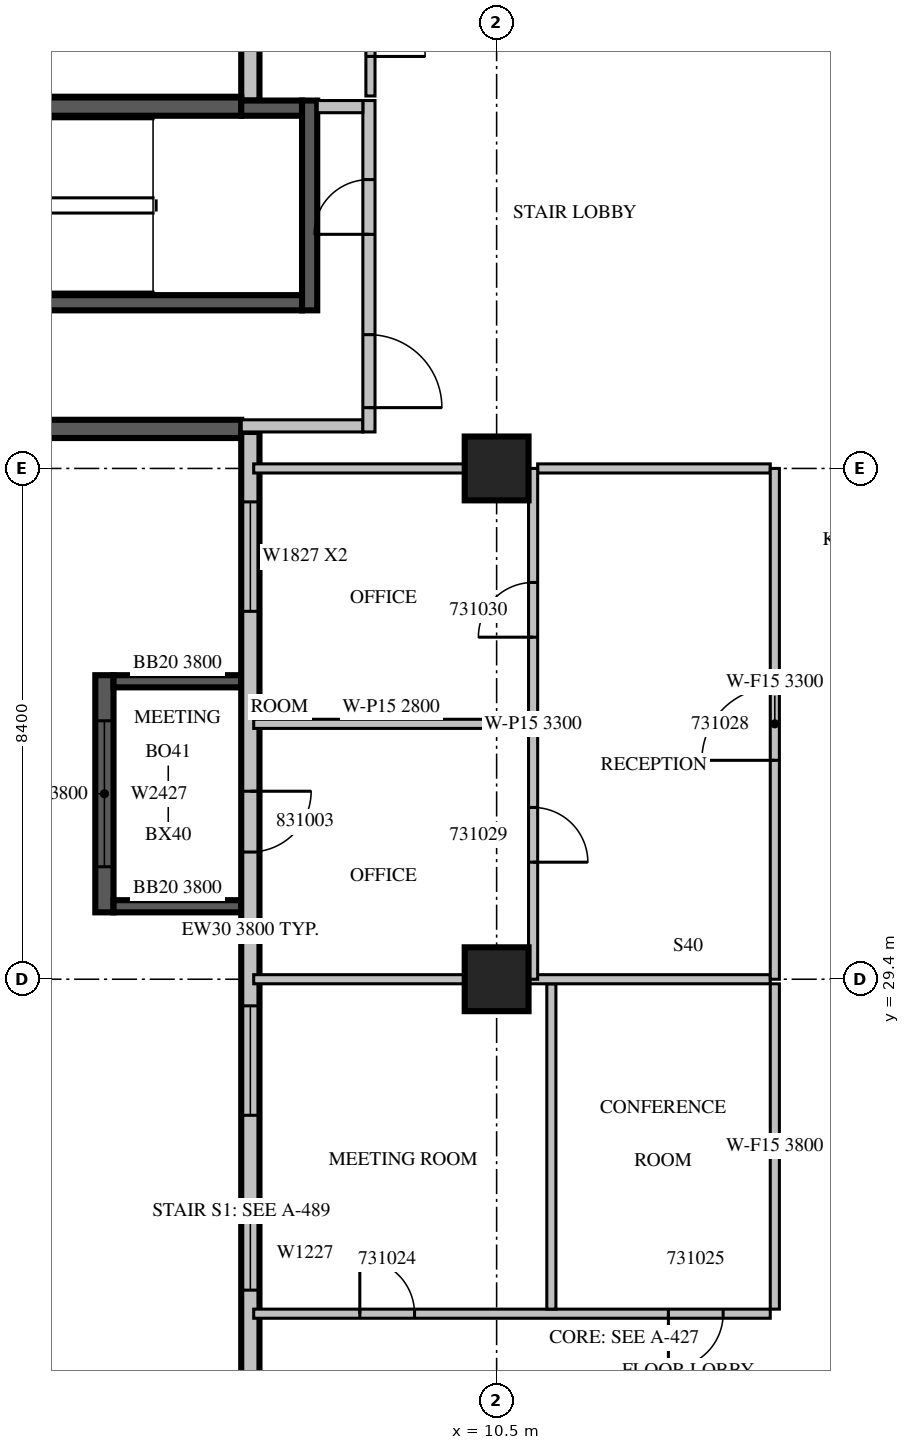
"""IFC4 building model, lengths in metres.
Left out: names, types, materials, properties, quantities, classifications, styles, units other than length and angle.
Written with IfcOpenShell. Run it as: python <this file> out.ifc"""

import sys

from ifc_helpers import new_model, si_unit, direction, frame, frame_2d, origin, origin_2d, place, context, subcontext, project, spatial, rectangle, extrude, source, transform, mapped, element, fill, save


model = new_model("IFC4")
c1 = context("Model", 3, precision=1e-05, world=origin(), true_north=direction((0.0, 1.0)))
c2 = subcontext(c1, "Body", "Model", "MODEL_VIEW")
j1 = project(units=[si_unit("LENGTHUNIT", "METRE"), si_unit("PLANEANGLEUNIT", "RADIAN")], contexts=[c1])
p1 = place(None, origin())
s1 = spatial("IfcSite", under=j1, at=p1, CompositionType="ELEMENT")
p2 = place(p1, origin())
s2 = spatial("IfcBuilding", under=s1, at=p2, CompositionType="ELEMENT")
p3 = place(p2, frame((0.0, 0.0, 141.3)))
s3 = spatial("IfcBuildingStorey", under=s2, at=p3, CompositionType="ELEMENT", Elevation=141.3)
m1 = source(origin(), c2, "Body", "SweptSolid", [
    extrude(rectangle(XDim=1.05, YDim=1.05, at=origin_2d()), origin(), (0.0, 0.0, 1.0), 4.2),
])
for number, where, z_axis, x_axis in (
    (1, (10.5, 29.4, 0.0), (0.0, 0.0, 1.0), (1.0, 0.0, 0.0)),
    (2, (10.5, 37.8, 0.0), (0.0, 0.0, 1.0), (1.0, 0.0, 0.0)),
):
    element("IfcColumn", number, at=place(p3, frame(where, z_axis=z_axis, x_axis=x_axis)), inside=s3, PredefinedType="COLUMN", context=c2, shape_type="MappedRepresentation", body=[
        mapped(m1, transform((0.0, 0.0, 0.0), scale=1.0)),
    ])
m2 = source(origin(), c2, "Body", "SweptSolid", [
    extrude(rectangle(XDim=3.9, YDim=0.3, at=frame_2d((1.95, 0.0))), origin(), (0.0, 0.0, 1.0), 3.8),
])
p4 = place(p3, frame((4.05, 34.4, 0.0), z_axis=(0.0, 0.0, 1.0), x_axis=(0.0, -1.0, 0.0)))
e3 = element("IfcWall", 3, at=p4, inside=s3, PredefinedType="SOLIDWALL", context=c2, shape_type="MappedRepresentation", body=[
    mapped(m2, transform((0.0, 0.0, 0.0), scale=1.0)),
])
m3 = source(origin(), c2, "Body", "SweptSolid", [
    extrude(rectangle(XDim=2.4, YDim=2.7, at=frame_2d((1.2, 1.35))), frame((0.0, 0.16, 0.0), z_axis=(0.0, -1.0, 0.0), x_axis=(1.0, 0.0, 0.0)), (0.0, 0.0, 1.0), 0.32),
])
p5 = place(p4, frame((0.75, 0.0, 0.6)))
e4 = element("IfcOpeningElement", 4, at=p5, cuts=e3, PredefinedType="OPENING", context=c2, shape_type="MappedRepresentation", body=[
    mapped(m3, transform((0.0, 0.0, 0.0), scale=1.0)),
])
m4 = source(origin(), c2, "Body", "SweptSolid", [
    extrude(rectangle(XDim=2.1, YDim=0.2, at=frame_2d((1.05, 0.0))), origin(), (0.0, 0.0, 1.0), 3.8),
])
for number, where, z_axis, x_axis in (
    (5, (6.3, 34.3, 0.0), (0.0, 0.0, 1.0), (-1.0, 0.0, 0.0)),
    (6, (6.3, 30.6, 0.0), (0.0, 0.0, 1.0), (-1.0, 0.0, 0.0)),
):
    element("IfcWall", number, at=place(p3, frame(where, z_axis=z_axis, x_axis=x_axis)), inside=s3, PredefinedType="SOLIDWALL", context=c2, shape_type="MappedRepresentation", body=[
        mapped(m4, transform((0.0, 0.0, 0.0), scale=1.0)),
    ])
m5 = source(origin(), c2, "Body", "SweptSolid", [
    extrude(rectangle(XDim=9.91, YDim=0.3, at=frame_2d((4.955, 0.0))), origin(), (0.0, 0.0, 1.0), 3.8),
])
p6 = place(p3, frame((6.45, 53.76, 0.0), z_axis=(0.0, 0.0, 1.0), x_axis=(0.0, -1.0, 0.0)))
e7 = element("IfcWall", 7, at=p6, inside=s3, PredefinedType="STANDARD", context=c2, shape_type="MappedRepresentation", body=[
    mapped(m5, transform((0.0, 0.0, 0.0), scale=1.0)),
])
p7 = place(p6, frame((4.272, 0.0, 0.6)))
e8 = element("IfcOpeningElement", 8, at=p7, cuts=e7, PredefinedType="OPENING", context=c2, shape_type="MappedRepresentation", body=[
    mapped(m3, transform((0.0, 0.0, 0.0), scale=1.0)),
])
p8 = place(p6, frame((0.936, 0.0, 0.6)))
e9 = element("IfcOpeningElement", 9, at=p8, cuts=e7, PredefinedType="OPENING", context=c2, shape_type="MappedRepresentation", body=[
    mapped(m3, transform((0.0, 0.0, 0.0), scale=1.0)),
])
m6 = source(origin(), c2, "Body", "SweptSolid", [
    extrude(rectangle(XDim=6.1, YDim=0.3, at=frame_2d((3.05, 0.0))), origin(), (0.0, 0.0, 1.0), 3.8),
])
for number, where, z_axis, x_axis in (
    (10, (6.3, 43.75, 0.0), (0.0, 0.0, 1.0), (-1.0, 0.0, 0.0)),
    (11, (0.2, 38.45, 0.0), (0.0, 0.0, 1.0), (1.0, 0.0, 0.0)),
):
    element("IfcWall", number, at=place(p3, frame(where, z_axis=z_axis, x_axis=x_axis)), inside=s3, PredefinedType="SOLIDWALL", context=c2, shape_type="MappedRepresentation", body=[
        mapped(m6, transform((0.0, 0.0, 0.0), scale=1.0)),
    ])
m7 = source(origin(), c2, "Body", "SweptSolid", [
    extrude(rectangle(XDim=16.4, YDim=0.3, at=frame_2d((8.2, 0.0))), origin(), (0.0, 0.0, 1.0), 3.8),
])
p9 = place(p3, frame((6.45, 38.4, 0.0), z_axis=(0.0, 0.0, 1.0), x_axis=(0.0, -1.0, 0.0)))
e12 = element("IfcWall", 12, at=p9, inside=s3, PredefinedType="STANDARD", context=c2, shape_type="MappedRepresentation", body=[
    mapped(m7, transform((0.0, 0.0, 0.0), scale=1.0)),
])
m8 = source(origin(), c2, "Body", "SweptSolid", [
    extrude(rectangle(XDim=1.8, YDim=2.7, at=frame_2d((0.9, 1.35))), frame((0.0, 0.16, 0.0), z_axis=(0.0, -1.0, 0.0), x_axis=(1.0, 0.0, 0.0)), (0.0, 0.0, 1.0), 0.32),
])
p10 = place(p9, frame((1.15, 0.0, 0.6)))
e13 = element("IfcOpeningElement", 13, at=p10, cuts=e12, PredefinedType="OPENING", context=c2, shape_type="MappedRepresentation", body=[
    mapped(m8, transform((0.0, 0.0, 0.0), scale=1.0)),
])
p11 = place(p9, frame((9.438, 0.0, 0.6)))
e14 = element("IfcOpeningElement", 14, at=p11, cuts=e12, PredefinedType="OPENING", context=c2, shape_type="MappedRepresentation", body=[
    mapped(m8, transform((0.0, 0.0, 0.0), scale=1.0)),
])
m9 = source(origin(), c2, "Body", "SweptSolid", [
    extrude(rectangle(XDim=1.2, YDim=2.7, at=frame_2d((0.6, 1.35))), frame((0.0, 0.16, 0.0), z_axis=(0.0, -1.0, 0.0), x_axis=(1.0, 0.0, 0.0)), (0.0, 0.0, 1.0), 0.32),
])
p12 = place(p9, frame((12.912, 0.0, 0.6)))
e15 = element("IfcOpeningElement", 15, at=p12, cuts=e12, PredefinedType="OPENING", context=c2, shape_type="MappedRepresentation", body=[
    mapped(m9, transform((0.0, 0.0, 0.0), scale=1.0)),
])
m10 = source(origin(), c2, "Body", "SweptSolid", [
    extrude(rectangle(XDim=1.0, YDim=2.1, at=frame_2d((0.5, 1.05))), frame((0.0, 0.16, 0.0), z_axis=(0.0, -1.0, 0.0), x_axis=(1.0, 0.0, 0.0)), (0.0, 0.0, 1.0), 0.32),
])
p13 = place(p9, frame((5.908, 0.0, 0.0)))
e16 = element("IfcOpeningElement", 16, at=p13, cuts=e12, PredefinedType="OPENING", context=c2, shape_type="MappedRepresentation", body=[
    mapped(m10, transform((0.0, 0.0, 0.0), scale=1.0)),
])
m11 = source(origin(), c2, "Body", "SweptSolid", [
    extrude(rectangle(XDim=7.0, YDim=0.25, at=frame_2d((3.5, 0.0))), origin(), (0.0, 0.0, 1.0), 3.8),
])
p14 = place(p3, frame((0.3, 40.525, 0.0), z_axis=(0.0, 0.0, 1.0), x_axis=(1.0, 0.0, 0.0)))
e17 = element("IfcWall", 17, at=p14, inside=s3, PredefinedType="SOLIDWALL", context=c2, shape_type="MappedRepresentation", body=[
    mapped(m11, transform((0.0, 0.0, 0.0), scale=1.0)),
])
m12 = source(origin(), c2, "Body", "SweptSolid", [
    extrude(rectangle(XDim=1.1, YDim=2.1, at=frame_2d((0.55, 1.05))), frame((0.0, 0.135, 0.0), z_axis=(0.0, -1.0, 0.0), x_axis=(1.0, 0.0, 0.0)), (0.0, 0.0, 1.0), 0.27),
])
p15 = place(p14, frame((0.55, 0.0, 0.0)))
e18 = element("IfcOpeningElement", 18, at=p15, cuts=e17, PredefinedType="OPENING", context=c2, shape_type="MappedRepresentation", body=[
    mapped(m12, transform((0.0, 0.0, 0.0), scale=1.0)),
])
m13 = source(origin(), c2, "Body", "SweptSolid", [
    extrude(rectangle(XDim=1.0, YDim=0.25, at=frame_2d((0.5, 0.0))), origin(), (0.0, 0.0, 1.0), 3.8),
])
p16 = place(p3, frame((6.3, 43.725, 0.0), z_axis=(0.0, 0.0, 1.0), x_axis=(1.0, 0.0, 0.0)))
e19 = element("IfcWall", 19, at=p16, inside=s3, PredefinedType="SOLIDWALL", context=c2, shape_type="MappedRepresentation", body=[
    mapped(m13, transform((0.0, 0.0, 0.0), scale=1.0)),
])
m14 = source(origin(), c2, "Body", "SweptSolid", [
    extrude(rectangle(XDim=3.45, YDim=0.25, at=frame_2d((1.725, 0.0))), origin(), (0.0, 0.0, 1.0), 3.8),
])
p17 = place(p3, frame((7.425, 40.4, 0.0), z_axis=(0.0, 0.0, 1.0), x_axis=(0.0, 1.0, 0.0)))
e20 = element("IfcWall", 20, at=p17, inside=s3, PredefinedType="SOLIDWALL", context=c2, shape_type="MappedRepresentation", body=[
    mapped(m14, transform((0.0, 0.0, 0.0), scale=1.0)),
])
m15 = source(origin(), c2, "Body", "SweptSolid", [
    extrude(rectangle(XDim=2.0, YDim=0.2, at=frame_2d((1.0, 0.0))), origin(), (0.0, 0.0, 1.0), 3.8),
])
p18 = place(p3, frame((6.3, 38.5, 0.0), z_axis=(0.0, 0.0, 1.0), x_axis=(1.0, 0.0, 0.0)))
e21 = element("IfcWall", 21, at=p18, inside=s3, PredefinedType="PARTITIONING", context=c2, shape_type="MappedRepresentation", body=[
    mapped(m15, transform((0.0, 0.0, 0.0), scale=1.0)),
])
m16 = source(origin(), c2, "Body", "SweptSolid", [
    extrude(rectangle(XDim=5.45, YDim=0.2, at=frame_2d((2.725, 0.0))), origin(), (0.0, 0.0, 1.0), 3.8),
])
p19 = place(p3, frame((8.4, 38.4, 0.0), z_axis=(0.0, 0.0, 1.0), x_axis=(0.0, 1.0, 0.0)))
e22 = element("IfcWall", 22, at=p19, inside=s3, PredefinedType="PARTITIONING", context=c2, shape_type="MappedRepresentation", body=[
    mapped(m16, transform((0.0, 0.0, 0.0), scale=1.0)),
])
m17 = source(origin(), c2, "Body", "SweptSolid", [
    extrude(rectangle(XDim=1.2, YDim=2.1, at=frame_2d((0.6, 1.05))), frame((0.0, 0.11, 0.0), z_axis=(0.0, -1.0, 0.0), x_axis=(1.0, 0.0, 0.0)), (0.0, 0.0, 1.0), 0.22),
])
p20 = place(p19, frame((0.4, 0.0, 0.0)))
e23 = element("IfcOpeningElement", 23, at=p20, cuts=e22, PredefinedType="OPENING", context=c2, shape_type="MappedRepresentation", body=[
    mapped(m17, transform((0.0, 0.0, 0.0), scale=1.0)),
])
m18 = source(origin(), c2, "Body", "SweptSolid", [
    extrude(rectangle(XDim=0.9, YDim=2.1, at=frame_2d((0.45, 1.05))), frame((0.0, 0.11, 0.0), z_axis=(0.0, -1.0, 0.0), x_axis=(1.0, 0.0, 0.0)), (0.0, 0.0, 1.0), 0.22),
])
p21 = place(p19, frame((3.25, 0.0, 0.0)))
e24 = element("IfcOpeningElement", 24, at=p21, cuts=e22, PredefinedType="OPENING", context=c2, shape_type="MappedRepresentation", body=[
    mapped(m18, transform((0.0, 0.0, 0.0), scale=1.0)),
])
m19 = source(origin(), c2, "Body", "SweptSolid", [
    extrude(rectangle(XDim=0.75, YDim=0.2, at=frame_2d((0.375, 0.0))), origin(), (0.0, 0.0, 1.0), 3.8),
])
p22 = place(p3, frame((7.55, 43.75, 0.0), z_axis=(0.0, 0.0, 1.0), x_axis=(1.0, 0.0, 0.0)))
e25 = element("IfcWall", 25, at=p22, inside=s3, PredefinedType="PARTITIONING", context=c2, shape_type="MappedRepresentation", body=[
    mapped(m19, transform((0.0, 0.0, 0.0), scale=1.0)),
])
m20 = source(origin(), c2, "Body", "SweptSolid", [
    extrude(rectangle(XDim=8.495, YDim=0.15, at=frame_2d((4.247, 0.0))), origin(), (0.0, 0.0, 1.0), 3.8),
])
p23 = place(p3, frame((6.505, 23.9, 0.0), z_axis=(0.0, 0.0, 1.0), x_axis=(1.0, 0.0, 0.0)))
e26 = element("IfcWall", 26, at=p23, inside=s3, PredefinedType="PARTITIONING", context=c2, shape_type="MappedRepresentation", body=[
    mapped(m20, transform((0.0, 0.0, 0.0), scale=1.0)),
])
m21 = source(origin(), c2, "Body", "SweptSolid", [
    extrude(rectangle(XDim=0.9, YDim=2.1, at=frame_2d((0.45, 1.05))), frame((0.0, 0.085, 0.0), z_axis=(0.0, -1.0, 0.0), x_axis=(1.0, 0.0, 0.0)), (0.0, 0.0, 1.0), 0.17),
])
p24 = place(p23, frame((1.745, 0.0, 0.0)))
e27 = element("IfcOpeningElement", 27, at=p24, cuts=e26, PredefinedType="OPENING", context=c2, shape_type="MappedRepresentation", body=[
    mapped(m21, transform((0.0, 0.0, 0.0), scale=1.0)),
])
p25 = place(p23, frame((6.82, 0.0, 0.0)))
e28 = element("IfcOpeningElement", 28, at=p25, cuts=e26, PredefinedType="OPENING", context=c2, shape_type="MappedRepresentation", body=[
    mapped(m21, transform((0.0, 0.0, 0.0), scale=1.0)),
])
m22 = source(origin(), c2, "Body", "SweptSolid", [
    extrude(rectangle(XDim=5.35, YDim=0.15, at=frame_2d((2.675, 0.0))), origin(), (0.0, 0.0, 1.0), 3.8),
])
for number, where, z_axis, x_axis in (
    (29, (11.4, 23.975, 0.0), (0.0, 0.0, 1.0), (0.0, 1.0, 0.0)),
    (30, (15.075, 23.975, 0.0), (0.0, 0.0, 1.0), (0.0, 1.0, 0.0)),
):
    element("IfcWall", number, at=place(p3, frame(where, z_axis=z_axis, x_axis=x_axis)), inside=s3, PredefinedType="PARTITIONING", context=c2, shape_type="MappedRepresentation", body=[
        mapped(m22, transform((0.0, 0.0, 0.0), scale=1.0)),
    ])
m23 = source(origin(), c2, "Body", "SweptSolid", [
    extrude(rectangle(XDim=3.471, YDim=0.15, at=frame_2d((1.736, 0.0))), origin(), (0.0, 0.0, 1.0), 3.8),
])
p26 = place(p3, frame((9.976, 29.4, 0.0), z_axis=(0.0, 0.0, 1.0), x_axis=(-1.0, 0.0, 0.0)))
e31 = element("IfcWall", 31, at=p26, inside=s3, PredefinedType="PARTITIONING", context=c2, shape_type="MappedRepresentation", body=[
    mapped(m23, transform((0.0, 0.0, 0.0), scale=1.0)),
])
m24 = source(origin(), c2, "Body", "SweptSolid", [
    extrude(rectangle(XDim=3.976, YDim=0.15, at=frame_2d((1.988, 0.0))), origin(), (0.0, 0.0, 1.0), 3.8),
])
p27 = place(p3, frame((15.0, 29.4, 0.0), z_axis=(0.0, 0.0, 1.0), x_axis=(-1.0, 0.0, 0.0)))
e32 = element("IfcWall", 32, at=p27, inside=s3, PredefinedType="PARTITIONING", context=c2, shape_type="MappedRepresentation", body=[
    mapped(m24, transform((0.0, 0.0, 0.0), scale=1.0)),
])
m25 = source(origin(), c2, "Body", "SweptSolid", [
    extrude(rectangle(XDim=2.2, YDim=0.15, at=frame_2d((1.1, 0.0))), origin(), (0.0, 0.0, 1.0), 3.8),
])
p28 = place(p3, frame((8.425, 43.925, 0.0), z_axis=(0.0, 0.0, 1.0), x_axis=(0.0, 1.0, 0.0)))
e33 = element("IfcWall", 33, at=p28, inside=s3, PredefinedType="PARTITIONING", context=c2, shape_type="MappedRepresentation", body=[
    mapped(m25, transform((0.0, 0.0, 0.0), scale=1.0)),
])
p29 = place(p28, frame((0.65, 0.0, 0.0)))
e34 = element("IfcOpeningElement", 34, at=p29, cuts=e33, PredefinedType="OPENING", context=c2, shape_type="MappedRepresentation", body=[
    mapped(m21, transform((0.0, 0.0, 0.0), scale=1.0)),
])
m26 = source(origin(), c2, "Body", "SweptSolid", [
    extrude(rectangle(XDim=4.52, YDim=0.15, at=frame_2d((2.26, 0.0))), origin(), (0.0, 0.0, 1.0), 2.8),
])
p30 = place(p3, frame((11.025, 33.6, 0.0), z_axis=(0.0, 0.0, 1.0), x_axis=(-1.0, 0.0, 0.0)))
e35 = element("IfcWall", 35, at=p30, inside=s3, PredefinedType="PARTITIONING", context=c2, shape_type="MappedRepresentation", body=[
    mapped(m26, transform((0.0, 0.0, 0.0), scale=1.0)),
])
p31 = place(p3, frame((9.976, 37.8, 0.0), z_axis=(0.0, 0.0, 1.0), x_axis=(-1.0, 0.0, 0.0)))
e36 = element("IfcWall", 36, at=p31, inside=s3, PredefinedType="PARTITIONING", context=c2, shape_type="MappedRepresentation", body=[
    mapped(m23, transform((0.0, 0.0, 0.0), scale=1.0)),
])
m27 = source(origin(), c2, "Body", "SweptSolid", [
    extrude(rectangle(XDim=3.825, YDim=0.15, at=frame_2d((1.913, 0.0))), origin(), (0.0, 0.0, 1.0), 3.8),
])
p32 = place(p3, frame((15.0, 37.8, 0.0), z_axis=(0.0, 0.0, 1.0), x_axis=(-1.0, 0.0, 0.0)))
e37 = element("IfcWall", 37, at=p32, inside=s3, PredefinedType="PARTITIONING", context=c2, shape_type="MappedRepresentation", body=[
    mapped(m27, transform((0.0, 0.0, 0.0), scale=1.0)),
])
m28 = source(origin(), c2, "Body", "SweptSolid", [
    extrude(rectangle(XDim=8.4, YDim=0.15, at=frame_2d((4.2, 0.0))), origin(), (0.0, 0.0, 1.0), 3.3),
])
p33 = place(p3, frame((11.1, 29.4, 0.0), z_axis=(0.0, 0.0, 1.0), x_axis=(0.0, 1.0, 0.0)))
e38 = element("IfcWall", 38, at=p33, inside=s3, PredefinedType="PARTITIONING", context=c2, shape_type="MappedRepresentation", body=[
    mapped(m28, transform((0.0, 0.0, 0.0), scale=1.0)),
])
p34 = place(p33, frame((1.925, 0.0, 0.0)))
e39 = element("IfcOpeningElement", 39, at=p34, cuts=e38, PredefinedType="OPENING", context=c2, shape_type="MappedRepresentation", body=[
    mapped(m21, transform((0.0, 0.0, 0.0), scale=1.0)),
])
p35 = place(p33, frame((5.625, 0.0, 0.0)))
e40 = element("IfcOpeningElement", 40, at=p35, cuts=e38, PredefinedType="OPENING", context=c2, shape_type="MappedRepresentation", body=[
    mapped(m21, transform((0.0, 0.0, 0.0), scale=1.0)),
])
p36 = place(p3, frame((15.075, 29.4, 0.0), z_axis=(0.0, 0.0, 1.0), x_axis=(0.0, 1.0, 0.0)))
e41 = element("IfcWall", 41, at=p36, inside=s3, PredefinedType="PARTITIONING", context=c2, shape_type="MappedRepresentation", body=[
    mapped(m28, transform((0.0, 0.0, 0.0), scale=1.0)),
])
m29 = source(origin(), c2, "Body", "SweptSolid", [
    extrude(rectangle(XDim=1.2, YDim=2.1, at=frame_2d((0.6, 1.05))), frame((0.0, 0.085, 0.0), z_axis=(0.0, -1.0, 0.0), x_axis=(1.0, 0.0, 0.0)), (0.0, 0.0, 1.0), 0.17),
])
p37 = place(p36, frame((3.6, 0.0, 0.0)))
e42 = element("IfcOpeningElement", 42, at=p37, cuts=e41, PredefinedType="OPENING", context=c2, shape_type="MappedRepresentation", body=[
    mapped(m29, transform((0.0, 0.0, 0.0), scale=1.0)),
])
m30 = source(origin(), c2, "Body", "SweptSolid", [
    extrude(rectangle(XDim=2.4, YDim=2.7, at=frame_2d((1.2, 1.35))), frame((0.0, 0.03, 0.0), z_axis=(0.0, -1.0, 0.0), x_axis=(1.0, 0.0, 0.0)), (0.0, 0.0, 1.0), 0.06),
])
p38 = place(p5, origin())
e43 = element("IfcWindow", 43, at=p38, inside=s3, PartitioningType="SINGLE_PANEL", PredefinedType="WINDOW", context=c2, shape_type="MappedRepresentation", body=[
    mapped(m30, transform((0.0, 0.0, 0.0), scale=1.0)),
])
fill(e4, e43)
m31 = source(origin(), c2, "Body", "SweptSolid", [
    extrude(rectangle(XDim=1.8, YDim=2.7, at=frame_2d((0.9, 1.35))), frame((0.0, 0.03, 0.0), z_axis=(0.0, -1.0, 0.0), x_axis=(1.0, 0.0, 0.0)), (0.0, 0.0, 1.0), 0.06),
])
p39 = place(p10, origin())
e44 = element("IfcWindow", 44, at=p39, inside=s3, PartitioningType="SINGLE_PANEL", PredefinedType="WINDOW", context=c2, shape_type="MappedRepresentation", body=[
    mapped(m31, transform((0.0, 0.0, 0.0), scale=1.0)),
])
fill(e13, e44)
p40 = place(p11, origin())
e45 = element("IfcWindow", 45, at=p40, inside=s3, PartitioningType="SINGLE_PANEL", PredefinedType="WINDOW", context=c2, shape_type="MappedRepresentation", body=[
    mapped(m31, transform((0.0, 0.0, 0.0), scale=1.0)),
])
fill(e14, e45)
m32 = source(origin(), c2, "Body", "SweptSolid", [
    extrude(rectangle(XDim=1.2, YDim=2.7, at=frame_2d((0.6, 1.35))), frame((0.0, 0.03, 0.0), z_axis=(0.0, -1.0, 0.0), x_axis=(1.0, 0.0, 0.0)), (0.0, 0.0, 1.0), 0.06),
])
p41 = place(p12, origin())
e46 = element("IfcWindow", 46, at=p41, inside=s3, PartitioningType="SINGLE_PANEL", PredefinedType="WINDOW", context=c2, shape_type="MappedRepresentation", body=[
    mapped(m32, transform((0.0, 0.0, 0.0), scale=1.0)),
])
fill(e15, e46)
m33 = source(origin(), c2, "Body", "SweptSolid", [
    extrude(rectangle(XDim=1.2, YDim=2.1, at=frame_2d((0.6, 1.05))), frame((0.0, 0.025, 0.0), z_axis=(0.0, -1.0, 0.0), x_axis=(1.0, 0.0, 0.0)), (0.0, 0.0, 1.0), 0.05),
])
p42 = place(p20, origin())
e47 = element("IfcDoor", 47, at=p42, inside=s3, OperationType="SINGLE_SWING_RIGHT", PredefinedType="DOOR", context=c2, shape_type="MappedRepresentation", body=[
    mapped(m33, transform((0.0, 0.0, 0.0), scale=1.0)),
])
fill(e23, e47)
m34 = source(origin(), c2, "Body", "SweptSolid", [
    extrude(rectangle(XDim=0.9, YDim=2.1, at=frame_2d((0.45, 1.05))), frame((0.0, 0.025, 0.0), z_axis=(0.0, -1.0, 0.0), x_axis=(1.0, 0.0, 0.0)), (0.0, 0.0, 1.0), 0.05),
])
p43 = place(p21, origin())
e48 = element("IfcDoor", 48, at=p43, inside=s3, OperationType="SINGLE_SWING_LEFT", PredefinedType="DOOR", context=c2, shape_type="MappedRepresentation", body=[
    mapped(m34, transform((0.0, 0.0, 0.0), scale=1.0)),
])
fill(e24, e48)
p44 = place(p24, origin())
e49 = element("IfcDoor", 49, at=p44, inside=s3, OperationType="SINGLE_SWING_LEFT", PredefinedType="DOOR", context=c2, shape_type="MappedRepresentation", body=[
    mapped(m34, transform((0.0, 0.0, 0.0), scale=1.0)),
])
fill(e27, e49)
p45 = place(p25, origin())
e50 = element("IfcDoor", 50, at=p45, inside=s3, OperationType="SINGLE_SWING_RIGHT", PredefinedType="DOOR", context=c2, shape_type="MappedRepresentation", body=[
    mapped(m34, transform((0.0, 0.0, 0.0), scale=1.0)),
])
fill(e28, e50)
p46 = place(p29, origin())
e51 = element("IfcDoor", 51, at=p46, inside=s3, OperationType="SINGLE_SWING_RIGHT", PredefinedType="DOOR", context=c2, shape_type="MappedRepresentation", body=[
    mapped(m34, transform((0.0, 0.0, 0.0), scale=1.0)),
])
fill(e34, e51)
p47 = place(p37, origin())
e52 = element("IfcDoor", 52, at=p47, inside=s3, OperationType="SINGLE_SWING_LEFT", PredefinedType="DOOR", context=c2, shape_type="MappedRepresentation", body=[
    mapped(m33, transform((0.0, 0.0, 0.0), scale=1.0)),
])
fill(e42, e52)
p48 = place(p34, origin())
e53 = element("IfcDoor", 53, at=p48, inside=s3, OperationType="SINGLE_SWING_RIGHT", PredefinedType="DOOR", context=c2, shape_type="MappedRepresentation", body=[
    mapped(m34, transform((0.0, 0.0, 0.0), scale=1.0)),
])
fill(e39, e53)
p49 = place(p35, origin())
e54 = element("IfcDoor", 54, at=p49, inside=s3, OperationType="SINGLE_SWING_LEFT", PredefinedType="DOOR", context=c2, shape_type="MappedRepresentation", body=[
    mapped(m34, transform((0.0, 0.0, 0.0), scale=1.0)),
])
fill(e40, e54)
m35 = source(origin(), c2, "Body", "SweptSolid", [
    extrude(rectangle(XDim=1.0, YDim=2.1, at=frame_2d((0.5, 1.05))), frame((0.0, 0.025, 0.0), z_axis=(0.0, -1.0, 0.0), x_axis=(1.0, 0.0, 0.0)), (0.0, 0.0, 1.0), 0.05),
])
p50 = place(p13, origin())
e55 = element("IfcDoor", 55, at=p50, inside=s3, OperationType="SINGLE_SWING_LEFT", PredefinedType="DOOR", context=c2, shape_type="MappedRepresentation", body=[
    mapped(m35, transform((0.0, 0.0, 0.0), scale=1.0)),
])
fill(e16, e55)
save(model, sys.argv[1])
